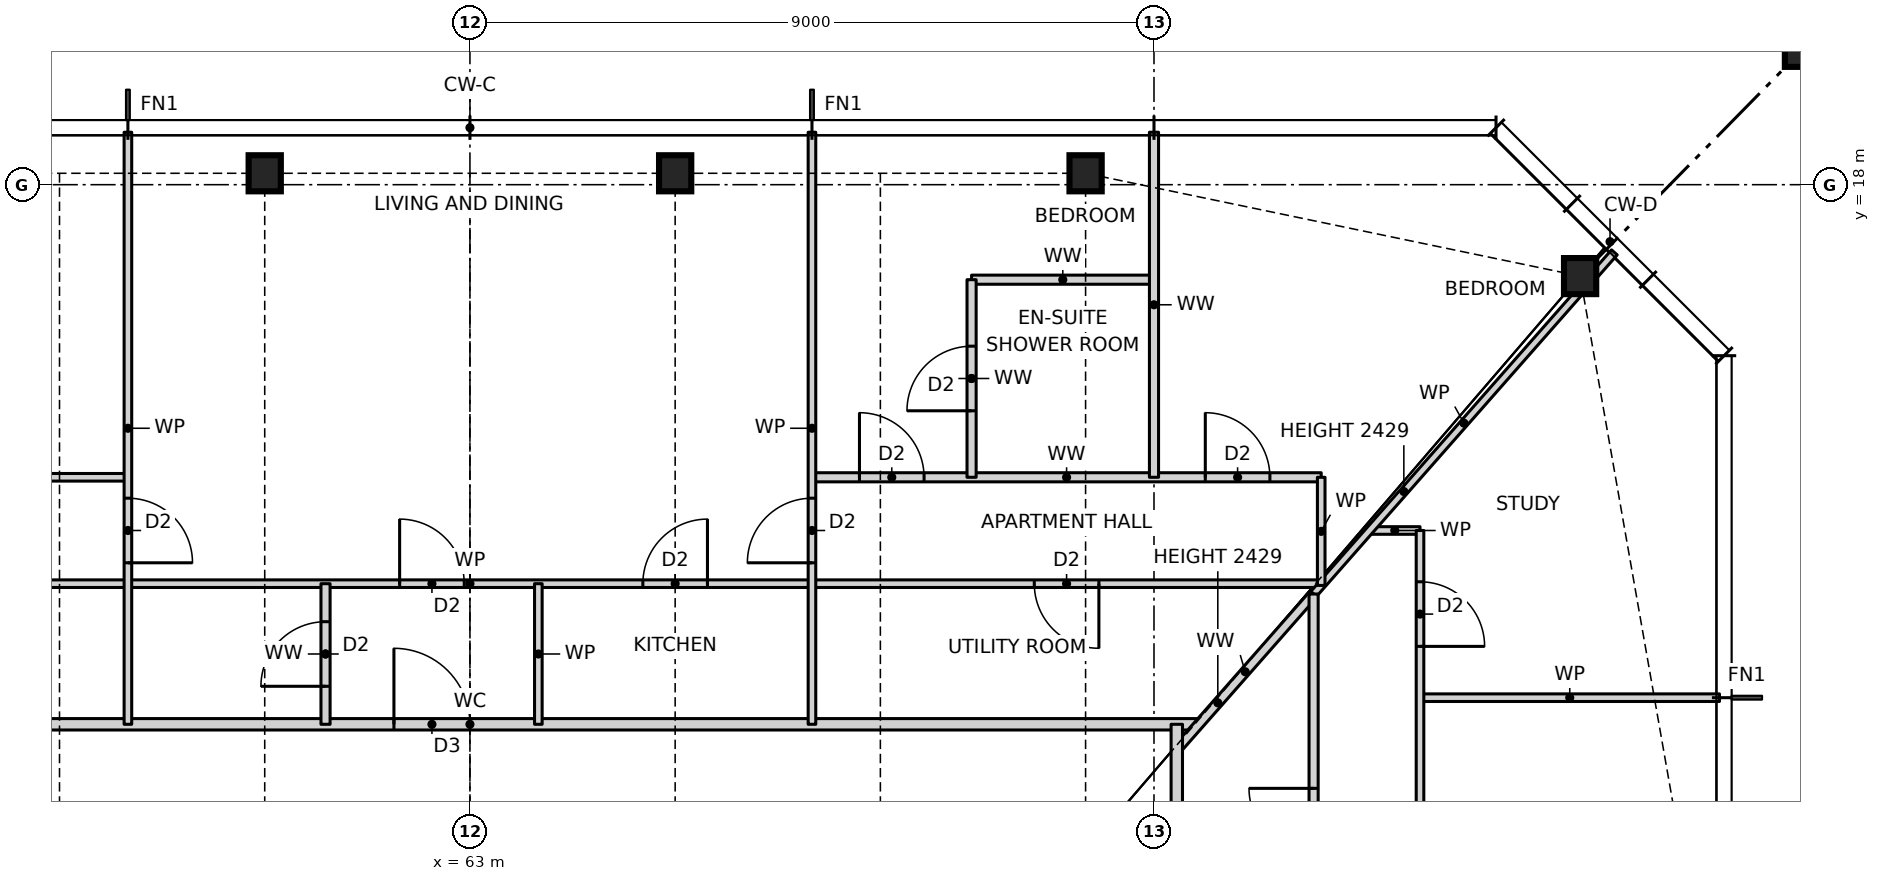
"""IFC4 building model, lengths in metres.
Left out: names, types, materials, properties, quantities, classifications, styles, units other than length and angle.
Written with IfcOpenShell. Run it as: python <this file> out.ifc"""

import sys

from ifc_helpers import new_model, si_unit, direction, frame, frame_2d, origin, origin_2d, place, context, subcontext, project, spatial, rectangle, hollow_rectangle, i_section, extrude, element, fill, save


model = new_model("IFC4")
c1 = context("Model", 3, precision=1e-05, world=origin(), true_north=direction((0.0, 1.0)))
c2 = subcontext(c1, "Body", "Model", "MODEL_VIEW")
j1 = project(units=[si_unit("LENGTHUNIT", "METRE"), si_unit("PLANEANGLEUNIT", "RADIAN")], contexts=[c1])
p1 = place(None, origin())
s1 = spatial("IfcSite", under=j1, at=p1, CompositionType="ELEMENT")
p2 = place(p1, origin())
s2 = spatial("IfcBuilding", under=s1, at=p2, CompositionType="ELEMENT")
p3 = place(p2, frame((0.0, 0.0, 36.0)))
s3 = spatial("IfcBuildingStorey", under=s2, at=p3, CompositionType="ELEMENT", Elevation=36.0)
for number, where, z_axis, x_axis in (
    (1, (77.606, 16.797, 0.0), (0.0, 0.0, 1.0), (1.0, 0.0, 0.0)),
    (2, (71.1, 18.15, 0.0), (0.0, 0.0, 1.0), (1.0, 0.0, 0.0)),
    (3, (65.7, 18.15, 0.0), (0.0, 0.0, 1.0), (1.0, 0.0, 0.0)),
    (4, (60.3, 18.15, 0.0), (0.0, 0.0, 1.0), (1.0, 0.0, 0.0)),
):
    element("IfcColumn", number, at=place(p3, frame(where, z_axis=z_axis, x_axis=x_axis)), inside=s3, PredefinedType="COLUMN", context=c2, shape_type="SweptSolid", body=[
        extrude(i_section(OverallWidth=0.424, OverallDepth=0.475, WebThickness=0.048, FlangeThickness=0.077, at=origin_2d()), origin(), (0.0, 0.0, 1.0), 3.5),
    ])
p4 = place(p3, frame((80.9, 20.15, 0.0), z_axis=(0.0, 0.0, 1.0), x_axis=(1.0, 0.0, 0.0)))
e5 = element("IfcColumn", 5, at=p4, inside=s3, PredefinedType="COLUMN", context=c2, shape_type="SweptSolid", body=[
    extrude(hollow_rectangle(XDim=1.2, YDim=1.2, WallThickness=0.07, at=origin_2d()), origin(), (0.0, 0.0, 1.0), 3.5),
])
p5 = place(p3, frame((53.408, 10.9, 0.0), z_axis=(0.0, 0.0, 1.0), x_axis=(1.0, 0.0, 0.0)))
e6 = element("IfcWall", 6, at=p5, inside=s3, PredefinedType="PARTITIONING", context=c2, shape_type="SweptSolid", body=[
    extrude(rectangle(XDim=19.184, YDim=0.15, at=frame_2d((9.592, 0.0))), origin(), (0.0, 0.0, 1.0), 3.27),
])
p6 = place(p5, frame((8.592, 0.0, 0.0)))
e7 = element("IfcOpeningElement", 7, at=p6, cuts=e6, PredefinedType="OPENING", context=c2, shape_type="SweptSolid", body=[
    extrude(rectangle(XDim=1.0, YDim=2.1, at=frame_2d((0.5, 1.05))), frame((0.0, 0.085, 0.0), z_axis=(0.0, -1.0, 0.0), x_axis=(1.0, 0.0, 0.0)), (0.0, 0.0, 1.0), 0.17),
])
p7 = place(p3, frame((75.5, 11.25, 0.0), z_axis=(0.0, 0.0, 1.0), x_axis=(1.0, 0.0, 0.0)))
e8 = element("IfcWall", 8, at=p7, inside=s3, PredefinedType="PARTITIONING", context=c2, shape_type="SweptSolid", body=[
    extrude(rectangle(XDim=3.94, YDim=0.1, at=frame_2d((1.97, 0.0))), origin(), (0.0, 0.0, 1.0), 3.27),
])
p8 = place(p3, frame((51.8, 12.75, 0.0), z_axis=(0.0, 0.0, 1.0), x_axis=(1.0, 0.0, 0.0)))
e9 = element("IfcWall", 9, at=p8, inside=s3, PredefinedType="PARTITIONING", context=c2, shape_type="SweptSolid", body=[
    extrude(rectangle(XDim=22.4, YDim=0.1, at=frame_2d((11.2, 0.0))), origin(), (0.0, 0.0, 1.0), 3.27),
])
p9 = place(p8, frame((13.475, 0.0, 0.0)))
e10 = element("IfcOpeningElement", 10, at=p9, cuts=e9, PredefinedType="OPENING", context=c2, shape_type="SweptSolid", body=[
    extrude(rectangle(XDim=0.85, YDim=2.1, at=frame_2d((0.425, 1.05))), frame((0.0, 0.06, 0.0), z_axis=(0.0, -1.0, 0.0), x_axis=(1.0, 0.0, 0.0)), (0.0, 0.0, 1.0), 0.12),
])
p10 = place(p8, frame((10.275, 0.0, 0.0)))
e11 = element("IfcOpeningElement", 11, at=p10, cuts=e9, PredefinedType="OPENING", context=c2, shape_type="SweptSolid", body=[
    extrude(rectangle(XDim=0.85, YDim=2.1, at=frame_2d((0.425, 1.05))), frame((0.0, 0.06, 0.0), z_axis=(0.0, -1.0, 0.0), x_axis=(1.0, 0.0, 0.0)), (0.0, 0.0, 1.0), 0.12),
])
p11 = place(p8, frame((18.625, 0.0, 0.0)))
e12 = element("IfcOpeningElement", 12, at=p11, cuts=e9, PredefinedType="OPENING", context=c2, shape_type="SweptSolid", body=[
    extrude(rectangle(XDim=0.85, YDim=2.1, at=frame_2d((0.425, 1.05))), frame((0.0, 0.06, 0.0), z_axis=(0.0, -1.0, 0.0), x_axis=(1.0, 0.0, 0.0)), (0.0, 0.0, 1.0), 0.12),
])
p12 = place(p8, frame((2.925, 0.0, 0.0)))
e13 = element("IfcOpeningElement", 13, at=p12, cuts=e9, PredefinedType="OPENING", context=c2, shape_type="SweptSolid", body=[
    extrude(rectangle(XDim=0.85, YDim=2.1, at=frame_2d((0.425, 1.05))), frame((0.0, 0.06, 0.0), z_axis=(0.0, -1.0, 0.0), x_axis=(1.0, 0.0, 0.0)), (0.0, 0.0, 1.0), 0.12),
])
p13 = place(p3, frame((74.836, 13.45, 0.0), z_axis=(0.0, 0.0, 1.0), x_axis=(1.0, 0.0, 0.0)))
e14 = element("IfcWall", 14, at=p13, inside=s3, PredefinedType="PARTITIONING", context=c2, shape_type="SweptSolid", body=[
    extrude(rectangle(XDim=0.664, YDim=0.1, at=frame_2d((0.332, 0.0))), origin(), (0.0, 0.0, 1.0), 3.27),
])
p14 = place(p3, frame((51.8, 14.15, 0.0), z_axis=(0.0, 0.0, 1.0), x_axis=(1.0, 0.0, 0.0)))
e15 = element("IfcWall", 15, at=p14, inside=s3, PredefinedType="PARTITIONING", context=c2, shape_type="SweptSolid", body=[
    extrude(rectangle(XDim=6.7, YDim=0.1, at=frame_2d((3.35, 0.0))), origin(), (0.0, 0.0, 1.0), 3.27),
])
p15 = place(p14, frame((4.025, 0.0, 0.0)))
e16 = element("IfcOpeningElement", 16, at=p15, cuts=e15, PredefinedType="OPENING", context=c2, shape_type="SweptSolid", body=[
    extrude(rectangle(XDim=0.85, YDim=2.1, at=frame_2d((0.425, 1.05))), frame((0.0, 0.06, 0.0), z_axis=(0.0, -1.0, 0.0), x_axis=(1.0, 0.0, 0.0)), (0.0, 0.0, 1.0), 0.12),
])
p16 = place(p14, frame((0.675, 0.0, 0.0)))
e17 = element("IfcOpeningElement", 17, at=p16, cuts=e15, PredefinedType="OPENING", context=c2, shape_type="SweptSolid", body=[
    extrude(rectangle(XDim=0.85, YDim=2.1, at=frame_2d((0.425, 1.05))), frame((0.0, 0.06, 0.0), z_axis=(0.0, -1.0, 0.0), x_axis=(1.0, 0.0, 0.0)), (0.0, 0.0, 1.0), 0.12),
])
p17 = place(p3, frame((67.5, 14.15, 0.0), z_axis=(0.0, 0.0, 1.0), x_axis=(1.0, 0.0, 0.0)))
e18 = element("IfcWall", 18, at=p17, inside=s3, PredefinedType="PARTITIONING", context=c2, shape_type="SweptSolid", body=[
    extrude(rectangle(XDim=6.7, YDim=0.12, at=frame_2d((3.35, 0.0))), origin(), (0.0, 0.0, 1.0), 3.27),
])
p18 = place(p17, frame((0.625, 0.0, 0.0)))
e19 = element("IfcOpeningElement", 19, at=p18, cuts=e18, PredefinedType="OPENING", context=c2, shape_type="SweptSolid", body=[
    extrude(rectangle(XDim=0.85, YDim=2.1, at=frame_2d((0.425, 1.05))), frame((0.0, 0.07, 0.0), z_axis=(0.0, -1.0, 0.0), x_axis=(1.0, 0.0, 0.0)), (0.0, 0.0, 1.0), 0.14),
])
p19 = place(p17, frame((5.175, 0.0, 0.0)))
e20 = element("IfcOpeningElement", 20, at=p19, cuts=e18, PredefinedType="OPENING", context=c2, shape_type="SweptSolid", body=[
    extrude(rectangle(XDim=0.85, YDim=2.1, at=frame_2d((0.425, 1.05))), frame((0.0, 0.07, 0.0), z_axis=(0.0, -1.0, 0.0), x_axis=(1.0, 0.0, 0.0)), (0.0, 0.0, 1.0), 0.14),
])
p20 = place(p3, frame((69.6, 16.75, 0.0), z_axis=(0.0, 0.0, 1.0), x_axis=(1.0, 0.0, 0.0)))
e21 = element("IfcWall", 21, at=p20, inside=s3, PredefinedType="PARTITIONING", context=c2, shape_type="SweptSolid", body=[
    extrude(rectangle(XDim=2.4, YDim=0.12, at=frame_2d((1.2, 0.0))), origin(), (0.0, 0.0, 1.0), 3.27),
])
p21 = place(p3, frame((74.1, 12.614, 0.0), z_axis=(0.0, 0.0, 1.0), x_axis=(0.660755619739, 0.750601099775, 0.0)))
e22 = element("IfcWall", 22, at=p21, inside=s3, PredefinedType="PARTITIONING", context=c2, shape_type="SweptSolid", body=[
    extrude(rectangle(XDim=5.989, YDim=0.1, at=frame_2d((2.995, 0.0))), origin(), (0.0, 0.0, 1.0), 2.429),
])
p22 = place(p3, frame((72.299, 10.569, 0.0), z_axis=(0.0, 0.0, 1.0), x_axis=(0.660797520752, 0.750564212155, 0.0)))
e23 = element("IfcWall", 23, at=p22, inside=s3, PredefinedType="PARTITIONING", context=c2, shape_type="SweptSolid", body=[
    extrude(rectangle(XDim=2.725, YDim=0.12, at=frame_2d((1.363, 0.0))), origin(), (0.0, 0.0, 1.0), 2.429),
])
p23 = place(p3, frame((75.5, 2.25, 0.0), z_axis=(0.0, 0.0, 1.0), x_axis=(0.0, 1.0, 0.0)))
e24 = element("IfcWall", 24, at=p23, inside=s3, PredefinedType="PARTITIONING", context=c2, shape_type="SweptSolid", body=[
    extrude(rectangle(XDim=11.2, YDim=0.1, at=frame_2d((5.6, 0.0))), origin(), (0.0, 0.0, 1.0), 3.27),
])
p24 = place(p23, frame((1.825, 0.0, 0.0)))
e25 = element("IfcOpeningElement", 25, at=p24, cuts=e24, PredefinedType="OPENING", context=c2, shape_type="SweptSolid", body=[
    extrude(rectangle(XDim=0.85, YDim=2.1, at=frame_2d((0.425, 1.05))), frame((0.0, 0.06, 0.0), z_axis=(0.0, -1.0, 0.0), x_axis=(1.0, 0.0, 0.0)), (0.0, 0.0, 1.0), 0.12),
])
p25 = place(p23, frame((6.325, 0.0, 0.0)))
e26 = element("IfcOpeningElement", 26, at=p25, cuts=e24, PredefinedType="OPENING", context=c2, shape_type="SweptSolid", body=[
    extrude(rectangle(XDim=0.85, YDim=2.1, at=frame_2d((0.425, 1.05))), frame((0.0, 0.06, 0.0), z_axis=(0.0, -1.0, 0.0), x_axis=(1.0, 0.0, 0.0)), (0.0, 0.0, 1.0), 0.12),
])
p26 = place(p23, frame((9.675, 0.0, 0.0)))
e27 = element("IfcOpeningElement", 27, at=p26, cuts=e24, PredefinedType="OPENING", context=c2, shape_type="SweptSolid", body=[
    extrude(rectangle(XDim=0.85, YDim=2.1, at=frame_2d((0.425, 1.05))), frame((0.0, 0.06, 0.0), z_axis=(0.0, -1.0, 0.0), x_axis=(1.0, 0.0, 0.0)), (0.0, 0.0, 1.0), 0.12),
])
p27 = place(p3, frame((74.2, 12.727, 0.0), z_axis=(0.0, 0.0, 1.0), x_axis=(0.0, 1.0, 0.0)))
e28 = element("IfcWall", 28, at=p27, inside=s3, PredefinedType="PARTITIONING", context=c2, shape_type="SweptSolid", body=[
    extrude(rectangle(XDim=1.423, YDim=0.1, at=frame_2d((0.711, 0.0))), origin(), (0.0, 0.0, 1.0), 3.27),
])
p28 = place(p3, frame((74.1, -12.614, 0.0), z_axis=(0.0, 0.0, 1.0), x_axis=(0.0, 1.0, 0.0)))
e29 = element("IfcWall", 29, at=p28, inside=s3, PredefinedType="PARTITIONING", context=c2, shape_type="SweptSolid", body=[
    extrude(rectangle(XDim=25.228, YDim=0.12, at=frame_2d((12.614, 0.0))), origin(), (0.0, 0.0, 1.0), 3.27),
])
p29 = place(p28, frame((7.239, 0.0, 0.0)))
e30 = element("IfcOpeningElement", 30, at=p29, cuts=e29, PredefinedType="OPENING", context=c2, shape_type="SweptSolid", body=[
    extrude(rectangle(XDim=0.85, YDim=2.1, at=frame_2d((0.425, 1.05))), frame((0.0, 0.07, 0.0), z_axis=(0.0, -1.0, 0.0), x_axis=(1.0, 0.0, 0.0)), (0.0, 0.0, 1.0), 0.14),
])
p30 = place(p28, frame((10.439, 0.0, 0.0)))
e31 = element("IfcOpeningElement", 31, at=p30, cuts=e29, PredefinedType="OPENING", context=c2, shape_type="SweptSolid", body=[
    extrude(rectangle(XDim=0.85, YDim=2.1, at=frame_2d((0.425, 1.05))), frame((0.0, 0.07, 0.0), z_axis=(0.0, -1.0, 0.0), x_axis=(1.0, 0.0, 0.0)), (0.0, 0.0, 1.0), 0.14),
])
p31 = place(p28, frame((2.507, 0.0, 0.0)))
e32 = element("IfcOpeningElement", 32, at=p31, cuts=e29, PredefinedType="OPENING", context=c2, shape_type="SweptSolid", body=[
    extrude(rectangle(XDim=0.85, YDim=2.1, at=frame_2d((0.425, 1.05))), frame((0.0, 0.07, 0.0), z_axis=(0.0, -1.0, 0.0), x_axis=(1.0, 0.0, 0.0)), (0.0, 0.0, 1.0), 0.14),
])
p32 = place(p28, frame((16.639, 0.0, 0.0)))
e33 = element("IfcOpeningElement", 33, at=p32, cuts=e29, PredefinedType="OPENING", context=c2, shape_type="SweptSolid", body=[
    extrude(rectangle(XDim=0.85, YDim=2.1, at=frame_2d((0.425, 1.05))), frame((0.0, 0.07, 0.0), z_axis=(0.0, -1.0, 0.0), x_axis=(1.0, 0.0, 0.0)), (0.0, 0.0, 1.0), 0.14),
])
p33 = place(p28, frame((21.821, 0.0, 0.0)))
e34 = element("IfcOpeningElement", 34, at=p33, cuts=e29, PredefinedType="OPENING", context=c2, shape_type="SweptSolid", body=[
    extrude(rectangle(XDim=0.85, YDim=2.1, at=frame_2d((0.425, 1.05))), frame((0.0, 0.07, 0.0), z_axis=(0.0, -1.0, 0.0), x_axis=(1.0, 0.0, 0.0)), (0.0, 0.0, 1.0), 0.14),
])
p34 = place(p3, frame((72.3, -10.568, 0.0), z_axis=(0.0, 0.0, 1.0), x_axis=(0.0, 1.0, 0.0)))
e35 = element("IfcWall", 35, at=p34, inside=s3, PredefinedType="PARTITIONING", context=c2, shape_type="SweptSolid", body=[
    extrude(rectangle(XDim=21.468, YDim=0.15, at=frame_2d((10.734, 0.0))), origin(), (0.0, 0.0, 1.0), 3.27),
])
p35 = place(p34, frame((8.318, 0.0, 0.0)))
e36 = element("IfcOpeningElement", 36, at=p35, cuts=e35, PredefinedType="OPENING", context=c2, shape_type="SweptSolid", body=[
    extrude(rectangle(XDim=1.0, YDim=2.1, at=frame_2d((0.5, 1.05))), frame((0.0, 0.085, 0.0), z_axis=(0.0, -1.0, 0.0), x_axis=(1.0, 0.0, 0.0)), (0.0, 0.0, 1.0), 0.17),
])
p36 = place(p3, frame((72.0, 14.15, 0.0), z_axis=(0.0, 0.0, 1.0), x_axis=(0.0, 1.0, 0.0)))
e37 = element("IfcWall", 37, at=p36, inside=s3, PredefinedType="PARTITIONING", context=c2, shape_type="SweptSolid", body=[
    extrude(rectangle(XDim=4.54, YDim=0.12, at=frame_2d((2.27, 0.0))), origin(), (0.0, 0.0, 1.0), 3.27),
])
p37 = place(p3, frame((69.6, 14.15, 0.0), z_axis=(0.0, 0.0, 1.0), x_axis=(0.0, 1.0, 0.0)))
e38 = element("IfcWall", 38, at=p37, inside=s3, PredefinedType="PARTITIONING", context=c2, shape_type="SweptSolid", body=[
    extrude(rectangle(XDim=2.6, YDim=0.12, at=frame_2d((1.3, 0.0))), origin(), (0.0, 0.0, 1.0), 3.27),
])
p38 = place(p37, frame((0.875, 0.0, 0.0)))
e39 = element("IfcOpeningElement", 39, at=p38, cuts=e38, PredefinedType="OPENING", context=c2, shape_type="SweptSolid", body=[
    extrude(rectangle(XDim=0.85, YDim=2.1, at=frame_2d((0.425, 1.05))), frame((0.0, 0.07, 0.0), z_axis=(0.0, -1.0, 0.0), x_axis=(1.0, 0.0, 0.0)), (0.0, 0.0, 1.0), 0.14),
])
p39 = place(p3, frame((67.5, 10.9, 0.0), z_axis=(0.0, 0.0, 1.0), x_axis=(0.0, 1.0, 0.0)))
e40 = element("IfcWall", 40, at=p39, inside=s3, PredefinedType="PARTITIONING", context=c2, shape_type="SweptSolid", body=[
    extrude(rectangle(XDim=7.79, YDim=0.1, at=frame_2d((3.895, 0.0))), origin(), (0.0, 0.0, 1.0), 3.27),
])
p40 = place(p39, frame((2.125, 0.0, 0.0)))
e41 = element("IfcOpeningElement", 41, at=p40, cuts=e40, PredefinedType="OPENING", context=c2, shape_type="SweptSolid", body=[
    extrude(rectangle(XDim=0.85, YDim=2.1, at=frame_2d((0.425, 1.05))), frame((0.0, 0.06, 0.0), z_axis=(0.0, -1.0, 0.0), x_axis=(1.0, 0.0, 0.0)), (0.0, 0.0, 1.0), 0.12),
])
p41 = place(p3, frame((63.9, 10.9, 0.0), z_axis=(0.0, 0.0, 1.0), x_axis=(0.0, 1.0, 0.0)))
e42 = element("IfcWall", 42, at=p41, inside=s3, PredefinedType="PARTITIONING", context=c2, shape_type="SweptSolid", body=[
    extrude(rectangle(XDim=1.85, YDim=0.1, at=frame_2d((0.925, 0.0))), origin(), (0.0, 0.0, 1.0), 3.27),
])
p42 = place(p3, frame((61.1, 10.9, 0.0), z_axis=(0.0, 0.0, 1.0), x_axis=(0.0, 1.0, 0.0)))
e43 = element("IfcWall", 43, at=p42, inside=s3, PredefinedType="PARTITIONING", context=c2, shape_type="SweptSolid", body=[
    extrude(rectangle(XDim=1.85, YDim=0.12, at=frame_2d((0.925, 0.0))), origin(), (0.0, 0.0, 1.0), 3.27),
])
p43 = place(p42, frame((0.5, 0.0, 0.0)))
e44 = element("IfcOpeningElement", 44, at=p43, cuts=e43, PredefinedType="OPENING", context=c2, shape_type="SweptSolid", body=[
    extrude(rectangle(XDim=0.85, YDim=2.1, at=frame_2d((0.425, 1.05))), frame((0.0, 0.07, 0.0), z_axis=(0.0, -1.0, 0.0), x_axis=(1.0, 0.0, 0.0)), (0.0, 0.0, 1.0), 0.14),
])
p44 = place(p3, frame((58.5, 10.9, 0.0), z_axis=(0.0, 0.0, 1.0), x_axis=(0.0, 1.0, 0.0)))
e45 = element("IfcWall", 45, at=p44, inside=s3, PredefinedType="PARTITIONING", context=c2, shape_type="SweptSolid", body=[
    extrude(rectangle(XDim=7.79, YDim=0.1, at=frame_2d((3.895, 0.0))), origin(), (0.0, 0.0, 1.0), 3.27),
])
p45 = place(p44, frame((2.125, 0.0, 0.0)))
e46 = element("IfcOpeningElement", 46, at=p45, cuts=e45, PredefinedType="OPENING", context=c2, shape_type="SweptSolid", body=[
    extrude(rectangle(XDim=0.85, YDim=2.1, at=frame_2d((0.425, 1.05))), frame((0.0, 0.06, 0.0), z_axis=(0.0, -1.0, 0.0), x_axis=(1.0, 0.0, 0.0)), (0.0, 0.0, 1.0), 0.12),
])
p46 = place(p26, frame((0.85, 0.0, 0.0), z_axis=(0.0, 0.0, 1.0), x_axis=(-1.0, 0.0, 0.0)))
e47 = element("IfcDoor", 47, at=p46, inside=s3, OperationType="SINGLE_SWING_RIGHT", PredefinedType="DOOR", context=c2, shape_type="SweptSolid", body=[
    extrude(rectangle(XDim=0.85, YDim=2.1, at=frame_2d((0.425, 1.05))), frame((0.0, 0.025, 0.0), z_axis=(0.0, -1.0, 0.0), x_axis=(1.0, 0.0, 0.0)), (0.0, 0.0, 1.0), 0.05),
])
fill(e27, e47)
p47 = place(p33, origin())
e48 = element("IfcDoor", 48, at=p47, inside=s3, OperationType="SINGLE_SWING_RIGHT", PredefinedType="DOOR", context=c2, shape_type="SweptSolid", body=[
    extrude(rectangle(XDim=0.85, YDim=2.1, at=frame_2d((0.425, 1.05))), frame((0.0, 0.025, 0.0), z_axis=(0.0, -1.0, 0.0), x_axis=(1.0, 0.0, 0.0)), (0.0, 0.0, 1.0), 0.05),
])
fill(e34, e48)
p48 = place(p9, origin())
e49 = element("IfcDoor", 49, at=p48, inside=s3, OperationType="SINGLE_SWING_RIGHT", PredefinedType="DOOR", context=c2, shape_type="SweptSolid", body=[
    extrude(rectangle(XDim=0.85, YDim=2.1, at=frame_2d((0.425, 1.05))), frame((0.0, 0.025, 0.0), z_axis=(0.0, -1.0, 0.0), x_axis=(1.0, 0.0, 0.0)), (0.0, 0.0, 1.0), 0.05),
])
fill(e10, e49)
p49 = place(p6, origin())
e50 = element("IfcDoor", 50, at=p49, inside=s3, OperationType="SINGLE_SWING_LEFT", PredefinedType="DOOR", context=c2, shape_type="SweptSolid", body=[
    extrude(rectangle(XDim=1.0, YDim=2.1, at=frame_2d((0.5, 1.05))), frame((0.0, 0.025, 0.0), z_axis=(0.0, -1.0, 0.0), x_axis=(1.0, 0.0, 0.0)), (0.0, 0.0, 1.0), 0.05),
])
fill(e7, e50)
p50 = place(p10, origin())
e51 = element("IfcDoor", 51, at=p50, inside=s3, OperationType="SINGLE_SWING_LEFT", PredefinedType="DOOR", context=c2, shape_type="SweptSolid", body=[
    extrude(rectangle(XDim=0.85, YDim=2.1, at=frame_2d((0.425, 1.05))), frame((0.0, 0.025, 0.0), z_axis=(0.0, -1.0, 0.0), x_axis=(1.0, 0.0, 0.0)), (0.0, 0.0, 1.0), 0.05),
])
fill(e11, e51)
p51 = place(p43, origin())
e52 = element("IfcDoor", 52, at=p51, inside=s3, OperationType="SINGLE_SWING_LEFT", PredefinedType="DOOR", context=c2, shape_type="SweptSolid", body=[
    extrude(rectangle(XDim=0.85, YDim=2.1, at=frame_2d((0.425, 1.05))), frame((0.0, 0.025, 0.0), z_axis=(0.0, -1.0, 0.0), x_axis=(1.0, 0.0, 0.0)), (0.0, 0.0, 1.0), 0.05),
])
fill(e44, e52)
p52 = place(p40, origin())
e53 = element("IfcDoor", 53, at=p52, inside=s3, OperationType="SINGLE_SWING_LEFT", PredefinedType="DOOR", context=c2, shape_type="SweptSolid", body=[
    extrude(rectangle(XDim=0.85, YDim=2.1, at=frame_2d((0.425, 1.05))), frame((0.0, 0.025, 0.0), z_axis=(0.0, -1.0, 0.0), x_axis=(1.0, 0.0, 0.0)), (0.0, 0.0, 1.0), 0.05),
])
fill(e41, e53)
p53 = place(p38, origin())
e54 = element("IfcDoor", 54, at=p53, inside=s3, OperationType="SINGLE_SWING_LEFT", PredefinedType="DOOR", context=c2, shape_type="SweptSolid", body=[
    extrude(rectangle(XDim=0.85, YDim=2.1, at=frame_2d((0.425, 1.05))), frame((0.0, 0.025, 0.0), z_axis=(0.0, -1.0, 0.0), x_axis=(1.0, 0.0, 0.0)), (0.0, 0.0, 1.0), 0.05),
])
fill(e39, e54)
p54 = place(p18, origin())
e55 = element("IfcDoor", 55, at=p54, inside=s3, OperationType="SINGLE_SWING_LEFT", PredefinedType="DOOR", context=c2, shape_type="SweptSolid", body=[
    extrude(rectangle(XDim=0.85, YDim=2.1, at=frame_2d((0.425, 1.05))), frame((0.0, 0.025, 0.0), z_axis=(0.0, -1.0, 0.0), x_axis=(1.0, 0.0, 0.0)), (0.0, 0.0, 1.0), 0.05),
])
fill(e19, e55)
p55 = place(p19, origin())
e56 = element("IfcDoor", 56, at=p55, inside=s3, OperationType="SINGLE_SWING_LEFT", PredefinedType="DOOR", context=c2, shape_type="SweptSolid", body=[
    extrude(rectangle(XDim=0.85, YDim=2.1, at=frame_2d((0.425, 1.05))), frame((0.0, 0.025, 0.0), z_axis=(0.0, -1.0, 0.0), x_axis=(1.0, 0.0, 0.0)), (0.0, 0.0, 1.0), 0.05),
])
fill(e20, e56)
p56 = place(p11, frame((0.85, 0.0, 0.0), z_axis=(0.0, 0.0, 1.0), x_axis=(-1.0, 0.0, 0.0)))
e57 = element("IfcDoor", 57, at=p56, inside=s3, OperationType="SINGLE_SWING_LEFT", PredefinedType="DOOR", context=c2, shape_type="SweptSolid", body=[
    extrude(rectangle(XDim=0.85, YDim=2.1, at=frame_2d((0.425, 1.05))), frame((0.0, 0.025, 0.0), z_axis=(0.0, -1.0, 0.0), x_axis=(1.0, 0.0, 0.0)), (0.0, 0.0, 1.0), 0.05),
])
fill(e12, e57)
p57 = place(p45, frame((0.85, 0.0, 0.0), z_axis=(0.0, 0.0, 1.0), x_axis=(-1.0, 0.0, 0.0)))
e58 = element("IfcDoor", 58, at=p57, inside=s3, OperationType="SINGLE_SWING_RIGHT", PredefinedType="DOOR", context=c2, shape_type="SweptSolid", body=[
    extrude(rectangle(XDim=0.85, YDim=2.1, at=frame_2d((0.425, 1.05))), frame((0.0, 0.025, 0.0), z_axis=(0.0, -1.0, 0.0), x_axis=(1.0, 0.0, 0.0)), (0.0, 0.0, 1.0), 0.05),
])
fill(e46, e58)
save(model, sys.argv[1])
